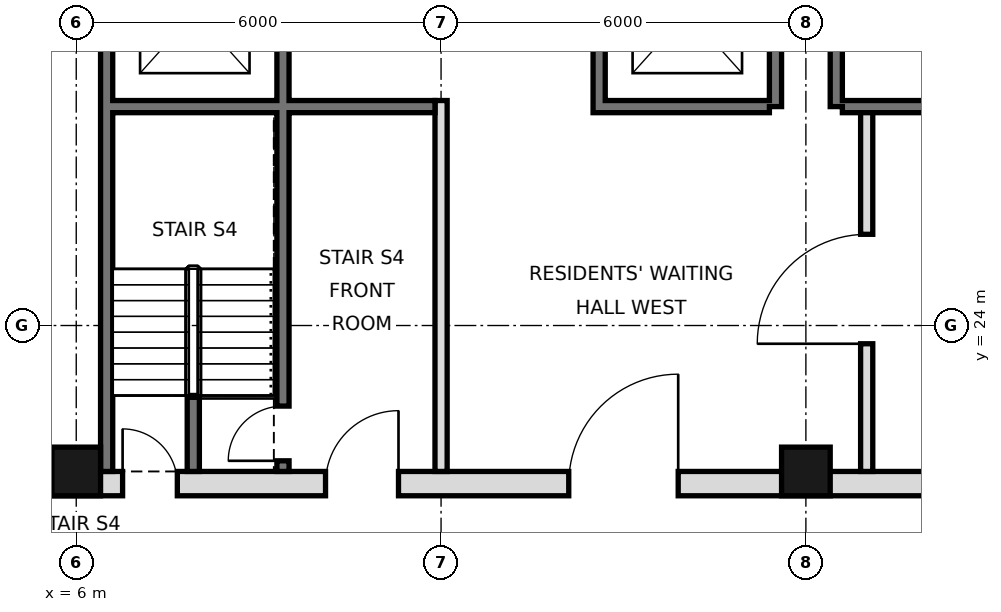
"""IFC4 building model, lengths in metres.
Left out: names, types, materials, properties, quantities, classifications, styles, units other than length and angle.
Written with IfcOpenShell. Run it as: python <this file> out.ifc"""

import sys

from ifc_helpers import new_model, si_unit, direction, frame, frame_2d, origin, origin_2d, place, context, subcontext, project, spatial, rectangle, hollow_rectangle, extrude, element, fill, save


model = new_model("IFC4")
c1 = context("Model", 3, precision=1e-05, world=origin(), true_north=direction((0.0, 1.0)))
c2 = subcontext(c1, "Body", "Model", "MODEL_VIEW")
j1 = project(units=[si_unit("LENGTHUNIT", "METRE"), si_unit("PLANEANGLEUNIT", "RADIAN")], contexts=[c1])
p1 = place(None, origin())
s1 = spatial("IfcSite", under=j1, at=p1, CompositionType="ELEMENT")
p2 = place(p1, origin())
s2 = spatial("IfcBuilding", under=s1, at=p2, CompositionType="ELEMENT")
p3 = place(p2, frame((0.0, 0.0, 90.2)))
s3 = spatial("IfcBuildingStorey", under=s2, at=p3, CompositionType="ELEMENT", Elevation=90.2)
for number, where, z_axis, x_axis in (
    (1, (6.0, 21.6, 0.0), (0.0, 0.0, 1.0), (1.0, 0.0, 0.0)),
    (2, (18.0, 21.6, 0.0), (0.0, 0.0, 1.0), (1.0, 0.0, 0.0)),
):
    element("IfcColumn", number, at=place(p3, frame(where, z_axis=z_axis, x_axis=x_axis)), inside=s3, PredefinedType="COLUMN", context=c2, shape_type="SweptSolid", body=[
        extrude(hollow_rectangle(XDim=0.8, YDim=0.8, WallThickness=0.06, at=origin_2d()), origin(), (0.0, 0.0, 1.0), 6.0),
    ])
p4 = place(p3, frame((6.5, 21.6, 0.0), z_axis=(0.0, 0.0, 1.0), x_axis=(0.0, 1.0, 0.0)))
e3 = element("IfcWall", 3, at=p4, inside=s3, PredefinedType="SOLIDWALL", context=c2, shape_type="SweptSolid", body=[
    extrude(rectangle(XDim=23.5, YDim=0.2, at=frame_2d((11.75, 0.0))), origin(), (0.0, 0.0, 1.0), 5.7),
])
for number, where, z_axis, x_axis in (
    (4, (17.5, 27.6, 0.0), (0.0, 0.0, 1.0), (0.0, 1.0, 0.0)),
    (5, (18.5, 27.6, 0.0), (0.0, 0.0, 1.0), (0.0, 1.0, 0.0)),
):
    element("IfcWall", number, at=place(p3, frame(where, z_axis=z_axis, x_axis=x_axis)), inside=s3, PredefinedType="SOLIDWALL", context=c2, shape_type="SweptSolid", body=[
        extrude(rectangle(XDim=17.5, YDim=0.2, at=frame_2d((8.75, 0.0))), origin(), (0.0, 0.0, 1.0), 5.7),
    ])
p5 = place(p3, frame((5.6, 21.4, 0.0), z_axis=(0.0, 0.0, 1.0), x_axis=(1.0, 0.0, 0.0)))
e6 = element("IfcWall", 6, at=p5, inside=s3, PredefinedType="SOLIDWALL", context=c2, shape_type="SweptSolid", body=[
    extrude(rectangle(XDim=36.8, YDim=0.4, at=frame_2d((18.4, 0.0))), origin(), (0.0, 0.0, 1.0), 5.7),
])
p6 = place(p5, frame((8.5, 0.0, 0.0)))
e7 = element("IfcOpeningElement", 7, at=p6, cuts=e6, PredefinedType="OPENING", context=c2, shape_type="SweptSolid", body=[
    extrude(rectangle(XDim=1.8, YDim=2.1, at=frame_2d((0.9, 1.05))), frame((0.0, 0.21, 0.0), z_axis=(0.0, -1.0, 0.0), x_axis=(1.0, 0.0, 0.0)), (0.0, 0.0, 1.0), 0.42),
])
p7 = place(p5, frame((17.5, 0.0, 0.0)))
e8 = element("IfcOpeningElement", 8, at=p7, cuts=e6, PredefinedType="OPENING", context=c2, shape_type="SweptSolid", body=[
    extrude(rectangle(XDim=1.8, YDim=2.1, at=frame_2d((0.9, 1.05))), frame((0.0, 0.21, 0.0), z_axis=(0.0, -1.0, 0.0), x_axis=(1.0, 0.0, 0.0)), (0.0, 0.0, 1.0), 0.42),
])
p8 = place(p5, frame((26.5, 0.0, 0.0)))
e9 = element("IfcOpeningElement", 9, at=p8, cuts=e6, PredefinedType="OPENING", context=c2, shape_type="SweptSolid", body=[
    extrude(rectangle(XDim=1.8, YDim=2.1, at=frame_2d((0.9, 1.05))), frame((0.0, 0.21, 0.0), z_axis=(0.0, -1.0, 0.0), x_axis=(1.0, 0.0, 0.0)), (0.0, 0.0, 1.0), 0.42),
])
p9 = place(p5, frame((4.5, 0.0, 0.0)))
e10 = element("IfcOpeningElement", 10, at=p9, cuts=e6, PredefinedType="OPENING", context=c2, shape_type="SweptSolid", body=[
    extrude(rectangle(XDim=1.2, YDim=2.1, at=frame_2d((0.6, 1.05))), frame((0.0, 0.21, 0.0), z_axis=(0.0, -1.0, 0.0), x_axis=(1.0, 0.0, 0.0)), (0.0, 0.0, 1.0), 0.42),
])
p10 = place(p5, frame((31.1, 0.0, 0.0)))
e11 = element("IfcOpeningElement", 11, at=p10, cuts=e6, PredefinedType="OPENING", context=c2, shape_type="SweptSolid", body=[
    extrude(rectangle(XDim=1.2, YDim=2.1, at=frame_2d((0.6, 1.05))), frame((0.0, 0.21, 0.0), z_axis=(0.0, -1.0, 0.0), x_axis=(1.0, 0.0, 0.0)), (0.0, 0.0, 1.0), 0.42),
])
p11 = place(p5, frame((1.163, 0.0, 0.0)))
e12 = element("IfcOpeningElement", 12, at=p11, cuts=e6, PredefinedType="OPENING", context=c2, shape_type="SweptSolid", body=[
    extrude(rectangle(XDim=0.9, YDim=2.1, at=frame_2d((0.45, 1.05))), frame((0.0, 0.21, 0.0), z_axis=(0.0, -1.0, 0.0), x_axis=(1.0, 0.0, 0.0)), (0.0, 0.0, 1.0), 0.42),
])
p12 = place(p5, frame((34.738, 0.0, 0.0)))
e13 = element("IfcOpeningElement", 13, at=p12, cuts=e6, PredefinedType="OPENING", context=c2, shape_type="SweptSolid", body=[
    extrude(rectangle(XDim=0.9, YDim=2.1, at=frame_2d((0.45, 1.05))), frame((0.0, 0.21, 0.0), z_axis=(0.0, -1.0, 0.0), x_axis=(1.0, 0.0, 0.0)), (0.0, 0.0, 1.0), 0.42),
])
p13 = place(p3, frame((19.0, 21.6, 0.0), z_axis=(0.0, 0.0, 1.0), x_axis=(0.0, 1.0, 0.0)))
e14 = element("IfcWall", 14, at=p13, inside=s3, PredefinedType="PARTITIONING", context=c2, shape_type="SweptSolid", body=[
    extrude(rectangle(XDim=6.0, YDim=0.2, at=frame_2d((3.0, 0.0))), origin(), (0.0, 0.0, 1.0), 5.7),
])
p14 = place(p13, frame((2.1, 0.0, 0.0)))
e15 = element("IfcOpeningElement", 15, at=p14, cuts=e14, PredefinedType="OPENING", context=c2, shape_type="SweptSolid", body=[
    extrude(rectangle(XDim=1.8, YDim=2.1, at=frame_2d((0.9, 1.05))), frame((0.0, 0.11, 0.0), z_axis=(0.0, -1.0, 0.0), x_axis=(1.0, 0.0, 0.0)), (0.0, 0.0, 1.0), 0.22),
])
p15 = place(p3, frame((12.0, 21.6, 0.0), z_axis=(0.0, 0.0, 1.0), x_axis=(0.0, 1.0, 0.0)))
e16 = element("IfcWall", 16, at=p15, inside=s3, PredefinedType="PARTITIONING", context=c2, shape_type="SweptSolid", body=[
    extrude(rectangle(XDim=6.1, YDim=0.2, at=frame_2d((3.05, 0.0))), origin(), (0.0, 0.0, 1.0), 5.7),
])
p16 = place(p3, frame((14.6, 27.5, 0.0), z_axis=(0.0, 0.0, 1.0), x_axis=(0.0, 1.0, 0.0)))
e17 = element("IfcWall", 17, at=p16, inside=s3, PredefinedType="SOLIDWALL", context=c2, shape_type="SweptSolid", body=[
    extrude(rectangle(XDim=17.5, YDim=0.2, at=frame_2d((8.75, 0.0))), origin(), (0.0, 0.0, 1.0), 5.7),
])
p17 = place(p16, frame((1.1, 0.0, 0.0)))
e18 = element("IfcOpeningElement", 18, at=p17, cuts=e17, PredefinedType="OPENING", context=c2, shape_type="SweptSolid", body=[
    extrude(rectangle(XDim=1.1, YDim=2.1, at=frame_2d((0.55, 1.05))), frame((0.0, 0.11, 0.0), z_axis=(0.0, -1.0, 0.0), x_axis=(1.0, 0.0, 0.0)), (0.0, 0.0, 1.0), 0.22),
])
p18 = place(p16, frame((4.2, 0.0, 0.0)))
e19 = element("IfcOpeningElement", 19, at=p18, cuts=e17, PredefinedType="OPENING", context=c2, shape_type="SweptSolid", body=[
    extrude(rectangle(XDim=1.1, YDim=2.1, at=frame_2d((0.55, 1.05))), frame((0.0, 0.11, 0.0), z_axis=(0.0, -1.0, 0.0), x_axis=(1.0, 0.0, 0.0)), (0.0, 0.0, 1.0), 0.22),
])
p19 = place(p16, frame((15.4, 0.0, 0.0)))
e20 = element("IfcOpeningElement", 20, at=p19, cuts=e17, PredefinedType="OPENING", context=c2, shape_type="SweptSolid", body=[
    extrude(rectangle(XDim=1.1, YDim=2.1, at=frame_2d((0.55, 1.05))), frame((0.0, 0.11, 0.0), z_axis=(0.0, -1.0, 0.0), x_axis=(1.0, 0.0, 0.0)), (0.0, 0.0, 1.0), 0.22),
])
p20 = place(p16, frame((9.9, 0.0, 0.0)))
e21 = element("IfcOpeningElement", 21, at=p20, cuts=e17, PredefinedType="OPENING", context=c2, shape_type="SweptSolid", body=[
    extrude(rectangle(XDim=0.9, YDim=2.1, at=frame_2d((0.45, 1.05))), frame((0.0, 0.11, 0.0), z_axis=(0.0, -1.0, 0.0), x_axis=(1.0, 0.0, 0.0)), (0.0, 0.0, 1.0), 0.22),
])
p21 = place(p3, frame((7.925, 21.6, 0.0), z_axis=(0.0, 0.0, 1.0), x_axis=(0.0, 1.0, 0.0)))
e22 = element("IfcWall", 22, at=p21, inside=s3, PredefinedType="SOLIDWALL", context=c2, shape_type="SweptSolid", body=[
    extrude(rectangle(XDim=1.25, YDim=0.2, at=frame_2d((0.625, 0.0))), origin(), (0.0, 0.0, 1.0), 5.7),
])
p22 = place(p3, frame((9.4, 21.6, 0.0), z_axis=(0.0, 0.0, 1.0), x_axis=(0.0, 1.0, 0.0)))
e23 = element("IfcWall", 23, at=p22, inside=s3, PredefinedType="SOLIDWALL", context=c2, shape_type="SweptSolid", body=[
    extrude(rectangle(XDim=23.4, YDim=0.2, at=frame_2d((11.7, 0.0))), origin(), (0.0, 0.0, 1.0), 5.7),
])
p23 = place(p22, frame((7.0, 0.0, 0.0)))
e24 = element("IfcOpeningElement", 24, at=p23, cuts=e23, PredefinedType="OPENING", context=c2, shape_type="SweptSolid", body=[
    extrude(rectangle(XDim=1.1, YDim=2.1, at=frame_2d((0.55, 1.05))), frame((0.0, 0.11, 0.0), z_axis=(0.0, -1.0, 0.0), x_axis=(1.0, 0.0, 0.0)), (0.0, 0.0, 1.0), 0.22),
])
p24 = place(p22, frame((10.1, 0.0, 0.0)))
e25 = element("IfcOpeningElement", 25, at=p24, cuts=e23, PredefinedType="OPENING", context=c2, shape_type="SweptSolid", body=[
    extrude(rectangle(XDim=1.1, YDim=2.1, at=frame_2d((0.55, 1.05))), frame((0.0, 0.11, 0.0), z_axis=(0.0, -1.0, 0.0), x_axis=(1.0, 0.0, 0.0)), (0.0, 0.0, 1.0), 0.22),
])
p25 = place(p22, frame((13.2, 0.0, 0.0)))
e26 = element("IfcOpeningElement", 26, at=p25, cuts=e23, PredefinedType="OPENING", context=c2, shape_type="SweptSolid", body=[
    extrude(rectangle(XDim=1.1, YDim=2.1, at=frame_2d((0.55, 1.05))), frame((0.0, 0.11, 0.0), z_axis=(0.0, -1.0, 0.0), x_axis=(1.0, 0.0, 0.0)), (0.0, 0.0, 1.0), 0.22),
])
p26 = place(p22, frame((15.7, 0.0, 0.0)))
e27 = element("IfcOpeningElement", 27, at=p26, cuts=e23, PredefinedType="OPENING", context=c2, shape_type="SweptSolid", body=[
    extrude(rectangle(XDim=1.0, YDim=2.1, at=frame_2d((0.5, 1.05))), frame((0.0, 0.11, 0.0), z_axis=(0.0, -1.0, 0.0), x_axis=(1.0, 0.0, 0.0)), (0.0, 0.0, 1.0), 0.22),
])
p27 = place(p22, frame((22.1, 0.0, 0.0)))
e28 = element("IfcOpeningElement", 28, at=p27, cuts=e23, PredefinedType="OPENING", context=c2, shape_type="SweptSolid", body=[
    extrude(rectangle(XDim=1.0, YDim=2.1, at=frame_2d((0.5, 1.05))), frame((0.0, 0.11, 0.0), z_axis=(0.0, -1.0, 0.0), x_axis=(1.0, 0.0, 0.0)), (0.0, 0.0, 1.0), 0.22),
])
p28 = place(p22, frame((0.175, 0.0, 0.0)))
e29 = element("IfcOpeningElement", 29, at=p28, cuts=e23, PredefinedType="OPENING", context=c2, shape_type="SweptSolid", body=[
    extrude(rectangle(XDim=0.9, YDim=2.1, at=frame_2d((0.45, 1.05))), frame((0.0, 0.11, 0.0), z_axis=(0.0, -1.0, 0.0), x_axis=(1.0, 0.0, 0.0)), (0.0, 0.0, 1.0), 0.22),
])
for number, where, z_axis, x_axis in (
    (30, (14.7, 27.6, 0.0), (0.0, 0.0, 1.0), (1.0, 0.0, 0.0)),
    (31, (18.6, 27.6, 0.0), (0.0, 0.0, 1.0), (1.0, 0.0, 0.0)),
):
    element("IfcWall", number, at=place(p3, frame(where, z_axis=z_axis, x_axis=x_axis)), inside=s3, PredefinedType="SOLIDWALL", context=c2, shape_type="SweptSolid", body=[
        extrude(rectangle(XDim=2.7, YDim=0.2, at=frame_2d((1.35, 0.0))), origin(), (0.0, 0.0, 1.0), 5.7),
    ])
p29 = place(p3, frame((6.6, 27.6, 0.0), z_axis=(0.0, 0.0, 1.0), x_axis=(1.0, 0.0, 0.0)))
e32 = element("IfcWall", 32, at=p29, inside=s3, PredefinedType="SOLIDWALL", context=c2, shape_type="SweptSolid", body=[
    extrude(rectangle(XDim=5.3, YDim=0.2, at=frame_2d((2.65, 0.0))), origin(), (0.0, 0.0, 1.0), 5.7),
])
p30 = place(p6, frame((1.8, 0.0, 0.0), z_axis=(0.0, 0.0, 1.0), x_axis=(-1.0, 0.0, 0.0)))
e33 = element("IfcDoor", 33, at=p30, inside=s3, OperationType="SINGLE_SWING_LEFT", PredefinedType="DOOR", context=c2, shape_type="SweptSolid", body=[
    extrude(rectangle(XDim=1.8, YDim=2.1, at=frame_2d((0.9, 1.05))), frame((0.0, 0.025, 0.0), z_axis=(0.0, -1.0, 0.0), x_axis=(1.0, 0.0, 0.0)), (0.0, 0.0, 1.0), 0.05),
])
fill(e7, e33)
p31 = place(p14, origin())
e34 = element("IfcDoor", 34, at=p31, inside=s3, OperationType="SINGLE_SWING_LEFT", PredefinedType="DOOR", context=c2, shape_type="SweptSolid", body=[
    extrude(rectangle(XDim=1.8, YDim=2.1, at=frame_2d((0.9, 1.05))), frame((0.0, 0.025, 0.0), z_axis=(0.0, -1.0, 0.0), x_axis=(1.0, 0.0, 0.0)), (0.0, 0.0, 1.0), 0.05),
])
fill(e15, e34)
p32 = place(p9, frame((1.2, 0.0, 0.0), z_axis=(0.0, 0.0, 1.0), x_axis=(-1.0, 0.0, 0.0)))
e35 = element("IfcDoor", 35, at=p32, inside=s3, OperationType="SINGLE_SWING_LEFT", PredefinedType="DOOR", context=c2, shape_type="SweptSolid", body=[
    extrude(rectangle(XDim=1.2, YDim=2.1, at=frame_2d((0.6, 1.05))), frame((0.0, 0.025, 0.0), z_axis=(0.0, -1.0, 0.0), x_axis=(1.0, 0.0, 0.0)), (0.0, 0.0, 1.0), 0.05),
])
fill(e10, e35)
p33 = place(p11, origin())
e36 = element("IfcDoor", 36, at=p33, inside=s3, OperationType="SINGLE_SWING_LEFT", PredefinedType="DOOR", context=c2, shape_type="SweptSolid", body=[
    extrude(rectangle(XDim=0.9, YDim=2.1, at=frame_2d((0.45, 1.05))), frame((0.0, 0.025, 0.0), z_axis=(0.0, -1.0, 0.0), x_axis=(1.0, 0.0, 0.0)), (0.0, 0.0, 1.0), 0.05),
])
fill(e12, e36)
p34 = place(p28, origin())
e37 = element("IfcDoor", 37, at=p34, inside=s3, OperationType="SINGLE_SWING_LEFT", PredefinedType="DOOR", context=c2, shape_type="SweptSolid", body=[
    extrude(rectangle(XDim=0.9, YDim=2.1, at=frame_2d((0.45, 1.05))), frame((0.0, 0.025, 0.0), z_axis=(0.0, -1.0, 0.0), x_axis=(1.0, 0.0, 0.0)), (0.0, 0.0, 1.0), 0.05),
])
fill(e29, e37)
save(model, sys.argv[1])
